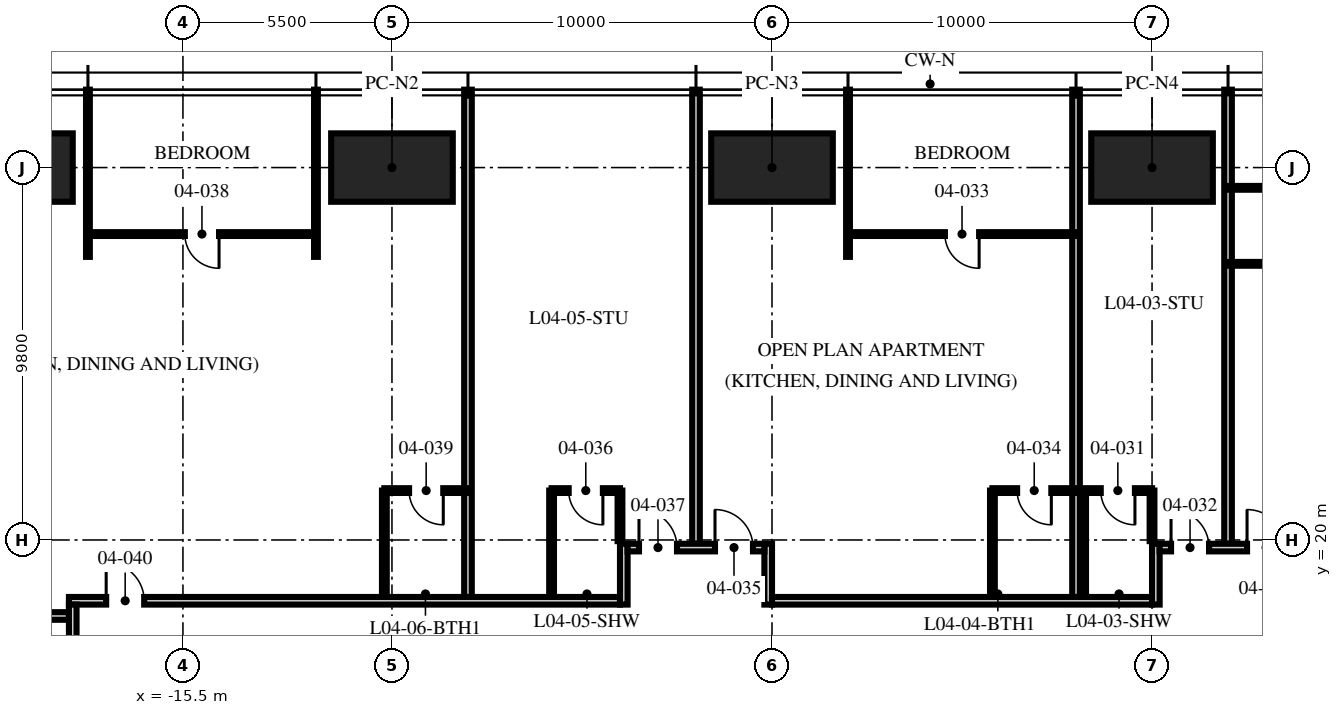
"""IFC4 building model, lengths in metres.
Left out: names, types, materials, properties, quantities, classifications, styles, units other than length and angle.
Written with IfcOpenShell. Run it as: python <this file> out.ifc"""

import sys

from ifc_helpers import new_model, si_unit, direction, frame, frame_2d, origin, origin_2d, place, context, subcontext, project, spatial, rectangle, hollow_rectangle, extrude, element, fill, save


model = new_model("IFC4")
c1 = context("Model", 3, precision=1e-05, world=origin(), true_north=direction((0.0, 1.0)))
c2 = subcontext(c1, "Body", "Model", "MODEL_VIEW")
j1 = project(units=[si_unit("LENGTHUNIT", "METRE"), si_unit("PLANEANGLEUNIT", "RADIAN")], contexts=[c1])
p1 = place(None, origin())
s1 = spatial("IfcSite", under=j1, at=p1, CompositionType="ELEMENT")
p2 = place(p1, origin())
s2 = spatial("IfcBuilding", under=s1, at=p2, CompositionType="ELEMENT")
p3 = place(p2, frame((0.0, 0.0, 21.0)))
s3 = spatial("IfcBuildingStorey", under=s2, at=p3, CompositionType="ELEMENT", Elevation=21.0)
for number, where, z_axis, x_axis in (
    (1, (-20.0, 29.8, 0.0), (0.0, 0.0, 1.0), (1.0, 0.0, 0.0)),
    (2, (-10.0, 29.8, 0.0), (0.0, 0.0, 1.0), (1.0, 0.0, 0.0)),
    (3, (0.0, 29.8, 0.0), (0.0, 0.0, 1.0), (1.0, 0.0, 0.0)),
    (4, (10.0, 29.8, 0.0), (0.0, 0.0, 1.0), (1.0, 0.0, 0.0)),
):
    element("IfcColumn", number, at=place(p3, frame(where, z_axis=z_axis, x_axis=x_axis)), inside=s3, PredefinedType="COLUMN", context=c2, shape_type="SweptSolid", body=[
        extrude(hollow_rectangle(XDim=3.2, YDim=1.8, WallThickness=0.2, at=origin_2d()), origin(), (0.0, 0.0, 1.0), 3.75),
    ])
p4 = place(p3, frame((12.0, 19.9, 0.0), z_axis=(0.0, 0.0, 1.0), x_axis=(0.0, 1.0, 0.0)))
e5 = element("IfcWall", 5, at=p4, inside=s3, PredefinedType="PARTITIONING", context=c2, shape_type="SweptSolid", body=[
    extrude(rectangle(XDim=11.95, YDim=0.2, at=frame_2d((5.975, 0.0))), origin(), (0.0, 0.0, 1.0), 2.71),
])
p5 = place(p3, frame((8.0, 18.5, 0.0), z_axis=(0.0, 0.0, 1.0), x_axis=(0.0, 1.0, 0.0)))
e6 = element("IfcWall", 6, at=p5, inside=s3, PredefinedType="PARTITIONING", context=c2, shape_type="SweptSolid", body=[
    extrude(rectangle(XDim=13.35, YDim=0.2, at=frame_2d((6.675, 0.0))), origin(), (0.0, 0.0, 1.0), 2.71),
])
p6 = place(p3, frame((2.0, 27.45, 0.0), z_axis=(0.0, 0.0, 1.0), x_axis=(0.0, 1.0, 0.0)))
e7 = element("IfcWall", 7, at=p6, inside=s3, PredefinedType="PARTITIONING", context=c2, shape_type="SweptSolid", body=[
    extrude(rectangle(XDim=4.4, YDim=0.1, at=frame_2d((2.2, 0.0))), origin(), (0.0, 0.0, 1.0), 2.71),
])
p7 = place(p3, frame((-2.0, 19.9, 0.0), z_axis=(0.0, 0.0, 1.0), x_axis=(0.0, 1.0, 0.0)))
e8 = element("IfcWall", 8, at=p7, inside=s3, PredefinedType="PARTITIONING", context=c2, shape_type="SweptSolid", body=[
    extrude(rectangle(XDim=11.95, YDim=0.2, at=frame_2d((5.975, 0.0))), origin(), (0.0, 0.0, 1.0), 2.71),
])
p8 = place(p3, frame((-8.0, 18.5, 0.0), z_axis=(0.0, 0.0, 1.0), x_axis=(0.0, 1.0, 0.0)))
e9 = element("IfcWall", 9, at=p8, inside=s3, PredefinedType="PARTITIONING", context=c2, shape_type="SweptSolid", body=[
    extrude(rectangle(XDim=13.35, YDim=0.2, at=frame_2d((6.675, 0.0))), origin(), (0.0, 0.0, 1.0), 2.71),
])
for number, where, z_axis, x_axis in (
    (10, (-12.0, 27.45, 0.0), (0.0, 0.0, 1.0), (0.0, 1.0, 0.0)),
    (11, (-18.0, 27.45, 0.0), (0.0, 0.0, 1.0), (0.0, 1.0, 0.0)),
):
    element("IfcWall", number, at=place(p3, frame(where, z_axis=z_axis, x_axis=x_axis)), inside=s3, PredefinedType="PARTITIONING", context=c2, shape_type="SweptSolid", body=[
        extrude(rectangle(XDim=4.4, YDim=0.1, at=frame_2d((2.2, 0.0))), origin(), (0.0, 0.0, 1.0), 2.71),
    ])
p9 = place(p3, frame((-18.5, 18.0, 0.0), z_axis=(0.0, 0.0, 1.0), x_axis=(-1.0, 0.0, 0.0)))
e12 = element("IfcWall", 12, at=p9, inside=s3, PredefinedType="PARTITIONING", context=c2, shape_type="SweptSolid", body=[
    extrude(rectangle(XDim=13.35, YDim=0.2, at=frame_2d((6.675, 0.0))), origin(), (0.0, 0.0, 1.0), 2.3),
])
p10 = place(p3, frame((18.0, 29.267, 0.0), z_axis=(0.0, 0.0, 1.0), x_axis=(-1.0, 0.0, 0.0)))
e13 = element("IfcWall", 13, at=p10, inside=s3, PredefinedType="PARTITIONING", context=c2, shape_type="SweptSolid", body=[
    extrude(rectangle(XDim=6.0, YDim=0.1, at=frame_2d((3.0, 0.0))), origin(), (0.0, 0.0, 1.0), 2.61),
])
p11 = place(p10, frame((0.15, 0.0, 0.0)))
e14 = element("IfcOpeningElement", 14, at=p11, cuts=e13, PredefinedType="OPENING", context=c2, shape_type="SweptSolid", body=[
    extrude(rectangle(XDim=0.9, YDim=2.1, at=frame_2d((0.45, 1.05))), frame((0.0, 0.06, 0.0), z_axis=(0.0, -1.0, 0.0), x_axis=(1.0, 0.0, 0.0)), (0.0, 0.0, 1.0), 0.12),
])
p12 = place(p10, frame((3.15, 0.0, 0.0)))
e15 = element("IfcOpeningElement", 15, at=p12, cuts=e13, PredefinedType="OPENING", context=c2, shape_type="SweptSolid", body=[
    extrude(rectangle(XDim=0.9, YDim=2.1, at=frame_2d((0.45, 1.05))), frame((0.0, 0.06, 0.0), z_axis=(0.0, -1.0, 0.0), x_axis=(1.0, 0.0, 0.0)), (0.0, 0.0, 1.0), 0.12),
])
p13 = place(p3, frame((16.8, 27.267, 0.0), z_axis=(0.0, 0.0, 1.0), x_axis=(-1.0, 0.0, 0.0)))
e16 = element("IfcWall", 16, at=p13, inside=s3, PredefinedType="PARTITIONING", context=c2, shape_type="SweptSolid", body=[
    extrude(rectangle(XDim=4.8, YDim=0.1, at=frame_2d((2.4, 0.0))), origin(), (0.0, 0.0, 1.0), 2.61),
])
p14 = place(p3, frame((10.0, 21.3, 0.0), z_axis=(0.0, 0.0, 1.0), x_axis=(-1.0, 0.0, 0.0)))
e17 = element("IfcWall", 17, at=p14, inside=s3, PredefinedType="PARTITIONING", context=c2, shape_type="SweptSolid", body=[
    extrude(rectangle(XDim=1.8, YDim=0.125, at=frame_2d((0.9, 0.0))), origin(), (0.0, 0.0, 1.0), 2.492),
])
p15 = place(p14, frame((0.45, 0.0, 0.0)))
e18 = element("IfcOpeningElement", 18, at=p15, cuts=e17, PredefinedType="OPENING", context=c2, shape_type="SweptSolid", body=[
    extrude(rectangle(XDim=0.9, YDim=2.1, at=frame_2d((0.45, 1.05))), frame((0.0, 0.073, 0.0), z_axis=(0.0, -1.0, 0.0), x_axis=(1.0, 0.0, 0.0)), (0.0, 0.0, 1.0), 0.145),
])
p16 = place(p3, frame((10.0, 19.97, 0.0), z_axis=(0.0, 0.0, 1.0), x_axis=(0.0, 1.0, 0.0)))
e19 = element("IfcWall", 19, at=p16, inside=s3, PredefinedType="PARTITIONING", context=c2, shape_type="SweptSolid", body=[
    extrude(rectangle(XDim=1.33, YDim=0.125, at=frame_2d((0.665, 0.0))), origin(), (0.0, 0.0, 1.0), 2.492),
])
p17 = place(p3, frame((8.2, 18.5, 0.0), z_axis=(0.0, 0.0, 1.0), x_axis=(0.0, 1.0, 0.0)))
e20 = element("IfcWall", 20, at=p17, inside=s3, PredefinedType="PARTITIONING", context=c2, shape_type="SweptSolid", body=[
    extrude(rectangle(XDim=2.8, YDim=0.125, at=frame_2d((1.4, 0.0))), origin(), (0.0, 0.0, 1.0), 3.5),
])
p18 = place(p3, frame((8.0, 28.05, 0.0), z_axis=(0.0, 0.0, 1.0), x_axis=(-1.0, 0.0, 0.0)))
e21 = element("IfcWall", 21, at=p18, inside=s3, PredefinedType="PARTITIONING", context=c2, shape_type="SweptSolid", body=[
    extrude(rectangle(XDim=6.0, YDim=0.1, at=frame_2d((3.0, 0.0))), origin(), (0.0, 0.0, 1.0), 2.61),
])
p19 = place(p18, frame((2.55, 0.0, 0.0)))
e22 = element("IfcOpeningElement", 22, at=p19, cuts=e21, PredefinedType="OPENING", context=c2, shape_type="SweptSolid", body=[
    extrude(rectangle(XDim=0.9, YDim=2.1, at=frame_2d((0.45, 1.05))), frame((0.0, 0.06, 0.0), z_axis=(0.0, -1.0, 0.0), x_axis=(1.0, 0.0, 0.0)), (0.0, 0.0, 1.0), 0.12),
])
p20 = place(p3, frame((8.0, 21.3, 0.0), z_axis=(0.0, 0.0, 1.0), x_axis=(-1.0, 0.0, 0.0)))
e23 = element("IfcWall", 23, at=p20, inside=s3, PredefinedType="PARTITIONING", context=c2, shape_type="SweptSolid", body=[
    extrude(rectangle(XDim=2.2, YDim=0.125, at=frame_2d((1.1, 0.0))), origin(), (0.0, 0.0, 1.0), 3.5),
])
p21 = place(p20, frame((0.65, 0.0, 0.0)))
e24 = element("IfcOpeningElement", 24, at=p21, cuts=e23, PredefinedType="OPENING", context=c2, shape_type="SweptSolid", body=[
    extrude(rectangle(XDim=0.9, YDim=2.1, at=frame_2d((0.45, 1.05))), frame((0.0, 0.073, 0.0), z_axis=(0.0, -1.0, 0.0), x_axis=(1.0, 0.0, 0.0)), (0.0, 0.0, 1.0), 0.145),
])
p22 = place(p3, frame((5.8, 18.5, 0.0), z_axis=(0.0, 0.0, 1.0), x_axis=(0.0, 1.0, 0.0)))
e25 = element("IfcWall", 25, at=p22, inside=s3, PredefinedType="PARTITIONING", context=c2, shape_type="SweptSolid", body=[
    extrude(rectangle(XDim=2.8, YDim=0.125, at=frame_2d((1.4, 0.0))), origin(), (0.0, 0.0, 1.0), 3.5),
])
p23 = place(p3, frame((-4.0, 21.3, 0.0), z_axis=(0.0, 0.0, 1.0), x_axis=(-1.0, 0.0, 0.0)))
e26 = element("IfcWall", 26, at=p23, inside=s3, PredefinedType="PARTITIONING", context=c2, shape_type="SweptSolid", body=[
    extrude(rectangle(XDim=1.8, YDim=0.125, at=frame_2d((0.9, 0.0))), origin(), (0.0, 0.0, 1.0), 2.61),
])
p24 = place(p23, frame((0.45, 0.0, 0.0)))
e27 = element("IfcOpeningElement", 27, at=p24, cuts=e26, PredefinedType="OPENING", context=c2, shape_type="SweptSolid", body=[
    extrude(rectangle(XDim=0.9, YDim=2.1, at=frame_2d((0.45, 1.05))), frame((0.0, 0.073, 0.0), z_axis=(0.0, -1.0, 0.0), x_axis=(1.0, 0.0, 0.0)), (0.0, 0.0, 1.0), 0.145),
])
p25 = place(p3, frame((-4.0, 19.97, 0.0), z_axis=(0.0, 0.0, 1.0), x_axis=(0.0, 1.0, 0.0)))
e28 = element("IfcWall", 28, at=p25, inside=s3, PredefinedType="PARTITIONING", context=c2, shape_type="SweptSolid", body=[
    extrude(rectangle(XDim=1.33, YDim=0.125, at=frame_2d((0.665, 0.0))), origin(), (0.0, 0.0, 1.0), 3.5),
])
p26 = place(p3, frame((-5.8, 18.5, 0.0), z_axis=(0.0, 0.0, 1.0), x_axis=(0.0, 1.0, 0.0)))
e29 = element("IfcWall", 29, at=p26, inside=s3, PredefinedType="PARTITIONING", context=c2, shape_type="SweptSolid", body=[
    extrude(rectangle(XDim=2.8, YDim=0.125, at=frame_2d((1.4, 0.0))), origin(), (0.0, 0.0, 1.0), 3.5),
])
p27 = place(p3, frame((-12.0, 28.05, 0.0), z_axis=(0.0, 0.0, 1.0), x_axis=(-1.0, 0.0, 0.0)))
e30 = element("IfcWall", 30, at=p27, inside=s3, PredefinedType="PARTITIONING", context=c2, shape_type="SweptSolid", body=[
    extrude(rectangle(XDim=6.0, YDim=0.1, at=frame_2d((3.0, 0.0))), origin(), (0.0, 0.0, 1.0), 2.61),
])
p28 = place(p27, frame((2.55, 0.0, 0.0)))
e31 = element("IfcOpeningElement", 31, at=p28, cuts=e30, PredefinedType="OPENING", context=c2, shape_type="SweptSolid", body=[
    extrude(rectangle(XDim=0.9, YDim=2.1, at=frame_2d((0.45, 1.05))), frame((0.0, 0.06, 0.0), z_axis=(0.0, -1.0, 0.0), x_axis=(1.0, 0.0, 0.0)), (0.0, 0.0, 1.0), 0.12),
])
p29 = place(p3, frame((-8.0, 21.3, 0.0), z_axis=(0.0, 0.0, 1.0), x_axis=(-1.0, 0.0, 0.0)))
e32 = element("IfcWall", 32, at=p29, inside=s3, PredefinedType="PARTITIONING", context=c2, shape_type="SweptSolid", body=[
    extrude(rectangle(XDim=2.2, YDim=0.125, at=frame_2d((1.1, 0.0))), origin(), (0.0, 0.0, 1.0), 2.492),
])
p30 = place(p29, frame((0.65, 0.0, 0.0)))
e33 = element("IfcOpeningElement", 33, at=p30, cuts=e32, PredefinedType="OPENING", context=c2, shape_type="SweptSolid", body=[
    extrude(rectangle(XDim=0.9, YDim=2.1, at=frame_2d((0.45, 1.05))), frame((0.0, 0.073, 0.0), z_axis=(0.0, -1.0, 0.0), x_axis=(1.0, 0.0, 0.0)), (0.0, 0.0, 1.0), 0.145),
])
p31 = place(p3, frame((-10.2, 18.5, 0.0), z_axis=(0.0, 0.0, 1.0), x_axis=(0.0, 1.0, 0.0)))
e34 = element("IfcWall", 34, at=p31, inside=s3, PredefinedType="PARTITIONING", context=c2, shape_type="SweptSolid", body=[
    extrude(rectangle(XDim=2.8, YDim=0.125, at=frame_2d((1.4, 0.0))), origin(), (0.0, 0.0, 1.0), 2.492),
])
p32 = place(p3, frame((-18.5, 18.4, 0.0), z_axis=(0.0, 0.0, 1.0), x_axis=(1.0, 0.0, 0.0)))
e35 = element("IfcWall", 35, at=p32, inside=s3, PredefinedType="PARTITIONING", context=c2, shape_type="SweptSolid", body=[
    extrude(rectangle(XDim=14.5, YDim=0.2, at=frame_2d((7.25, 0.0))), origin(), (0.0, 0.0, 1.0), 2.3),
])
p33 = place(p32, frame((0.98, 0.0, 0.0)))
e36 = element("IfcOpeningElement", 36, at=p33, cuts=e35, PredefinedType="OPENING", context=c2, shape_type="SweptSolid", body=[
    extrude(rectangle(XDim=1.0, YDim=2.2, at=frame_2d((0.5, 1.1))), frame((0.0, 0.11, 0.0), z_axis=(0.0, -1.0, 0.0), x_axis=(1.0, 0.0, 0.0)), (0.0, 0.0, 1.0), 0.22),
])
p34 = place(p3, frame((-3.9, 18.3, 0.0), z_axis=(0.0, 0.0, 1.0), x_axis=(0.0, 1.0, 0.0)))
e37 = element("IfcWall", 37, at=p34, inside=s3, PredefinedType="PARTITIONING", context=c2, shape_type="SweptSolid", body=[
    extrude(rectangle(XDim=1.6, YDim=0.2, at=frame_2d((0.8, 0.0))), origin(), (0.0, 0.0, 1.0), 3.5),
])
p35 = place(p3, frame((-0.1, 18.3, 0.0), z_axis=(0.0, 0.0, 1.0), x_axis=(0.0, 1.0, 0.0)))
e38 = element("IfcWall", 38, at=p35, inside=s3, PredefinedType="PARTITIONING", context=c2, shape_type="SweptSolid", body=[
    extrude(rectangle(XDim=1.6, YDim=0.2, at=frame_2d((0.8, 0.0))), origin(), (0.0, 0.0, 1.0), 2.492),
])
p36 = place(p3, frame((-3.8, 19.8, 0.0), z_axis=(0.0, 0.0, 1.0), x_axis=(1.0, 0.0, 0.0)))
e39 = element("IfcWall", 39, at=p36, inside=s3, PredefinedType="PARTITIONING", context=c2, shape_type="SweptSolid", body=[
    extrude(rectangle(XDim=3.6, YDim=0.2, at=frame_2d((1.8, 0.0))), origin(), (0.0, 0.0, 1.0), 3.5),
])
p37 = place(p36, frame((2.3, 0.0, 0.0)))
e40 = element("IfcOpeningElement", 40, at=p37, cuts=e39, PredefinedType="OPENING", context=c2, shape_type="SweptSolid", body=[
    extrude(rectangle(XDim=1.0, YDim=2.2, at=frame_2d((0.5, 1.1))), frame((0.0, 0.11, 0.0), z_axis=(0.0, -1.0, 0.0), x_axis=(1.0, 0.0, 0.0)), (0.0, 0.0, 1.0), 0.22),
])
p38 = place(p36, frame((0.3, 0.0, 0.0)))
e41 = element("IfcOpeningElement", 41, at=p38, cuts=e39, PredefinedType="OPENING", context=c2, shape_type="SweptSolid", body=[
    extrude(rectangle(XDim=1.0, YDim=2.2, at=frame_2d((0.5, 1.1))), frame((0.0, 0.11, 0.0), z_axis=(0.0, -1.0, 0.0), x_axis=(1.0, 0.0, 0.0)), (0.0, 0.0, 1.0), 0.22),
])
p39 = place(p3, frame((0.0, 18.4, 0.0), z_axis=(0.0, 0.0, 1.0), x_axis=(1.0, 0.0, 0.0)))
e42 = element("IfcWall", 42, at=p39, inside=s3, PredefinedType="PARTITIONING", context=c2, shape_type="SweptSolid", body=[
    extrude(rectangle(XDim=10.0, YDim=0.2, at=frame_2d((5.0, 0.0))), origin(), (0.0, 0.0, 1.0), 2.492),
])
p40 = place(p3, frame((10.1, 18.3, 0.0), z_axis=(0.0, 0.0, 1.0), x_axis=(0.0, 1.0, 0.0)))
e43 = element("IfcWall", 43, at=p40, inside=s3, PredefinedType="PARTITIONING", context=c2, shape_type="SweptSolid", body=[
    extrude(rectangle(XDim=1.6, YDim=0.2, at=frame_2d((0.8, 0.0))), origin(), (0.0, 0.0, 1.0), 2.492),
])
p41 = place(p3, frame((10.2, 19.8, 0.0), z_axis=(0.0, 0.0, 1.0), x_axis=(1.0, 0.0, 0.0)))
e44 = element("IfcWall", 44, at=p41, inside=s3, PredefinedType="PARTITIONING", context=c2, shape_type="SweptSolid", body=[
    extrude(rectangle(XDim=3.6, YDim=0.2, at=frame_2d((1.8, 0.0))), origin(), (0.0, 0.0, 1.0), 3.5),
])
p42 = place(p41, frame((2.3, 0.0, 0.0)))
e45 = element("IfcOpeningElement", 45, at=p42, cuts=e44, PredefinedType="OPENING", context=c2, shape_type="SweptSolid", body=[
    extrude(rectangle(XDim=1.0, YDim=2.2, at=frame_2d((0.5, 1.1))), frame((0.0, 0.11, 0.0), z_axis=(0.0, -1.0, 0.0), x_axis=(1.0, 0.0, 0.0)), (0.0, 0.0, 1.0), 0.22),
])
p43 = place(p41, frame((0.3, 0.0, 0.0)))
e46 = element("IfcOpeningElement", 46, at=p43, cuts=e44, PredefinedType="OPENING", context=c2, shape_type="SweptSolid", body=[
    extrude(rectangle(XDim=1.0, YDim=2.2, at=frame_2d((0.5, 1.1))), frame((0.0, 0.11, 0.0), z_axis=(0.0, -1.0, 0.0), x_axis=(1.0, 0.0, 0.0)), (0.0, 0.0, 1.0), 0.22),
])
p44 = place(p3, frame((-18.4, 18.3, 0.0), z_axis=(0.0, 0.0, 1.0), x_axis=(0.0, -1.0, 0.0)))
e47 = element("IfcWall", 47, at=p44, inside=s3, PredefinedType="PARTITIONING", context=c2, shape_type="SweptSolid", body=[
    extrude(rectangle(XDim=36.6, YDim=0.2, at=frame_2d((18.3, 0.0))), origin(), (0.0, 0.0, 1.0), 2.3),
])
p45 = place(p44, frame((8.57, 0.0, 0.0)))
e48 = element("IfcOpeningElement", 48, at=p45, cuts=e47, PredefinedType="OPENING", context=c2, shape_type="SweptSolid", body=[
    extrude(rectangle(XDim=1.0, YDim=2.2, at=frame_2d((0.5, 1.1))), frame((0.0, 0.11, 0.0), z_axis=(0.0, -1.0, 0.0), x_axis=(1.0, 0.0, 0.0)), (0.0, 0.0, 1.0), 0.22),
])
p46 = place(p44, frame((24.57, 0.0, 0.0)))
e49 = element("IfcOpeningElement", 49, at=p46, cuts=e47, PredefinedType="OPENING", context=c2, shape_type="SweptSolid", body=[
    extrude(rectangle(XDim=1.0, YDim=2.2, at=frame_2d((0.5, 1.1))), frame((0.0, 0.11, 0.0), z_axis=(0.0, -1.0, 0.0), x_axis=(1.0, 0.0, 0.0)), (0.0, 0.0, 1.0), 0.22),
])
p47 = place(p44, frame((28.87, 0.0, 0.0)))
e50 = element("IfcOpeningElement", 50, at=p47, cuts=e47, PredefinedType="OPENING", context=c2, shape_type="SweptSolid", body=[
    extrude(rectangle(XDim=1.0, YDim=2.2, at=frame_2d((0.5, 1.1))), frame((0.0, 0.11, 0.0), z_axis=(0.0, -1.0, 0.0), x_axis=(1.0, 0.0, 0.0)), (0.0, 0.0, 1.0), 0.22),
])
p48 = place(p44, frame((34.82, 0.0, 0.0)))
e51 = element("IfcOpeningElement", 51, at=p48, cuts=e47, PredefinedType="OPENING", context=c2, shape_type="SweptSolid", body=[
    extrude(rectangle(XDim=1.0, YDim=2.2, at=frame_2d((0.5, 1.1))), frame((0.0, 0.11, 0.0), z_axis=(0.0, -1.0, 0.0), x_axis=(1.0, 0.0, 0.0)), (0.0, 0.0, 1.0), 0.22),
])
p49 = place(p42, origin())
e52 = element("IfcDoor", 52, at=p49, inside=s3, OperationType="SINGLE_SWING_LEFT", PredefinedType="DOOR", context=c2, shape_type="SweptSolid", body=[
    extrude(rectangle(XDim=1.0, YDim=2.2, at=frame_2d((0.5, 1.1))), frame((0.0, 0.025, 0.0), z_axis=(0.0, -1.0, 0.0), x_axis=(1.0, 0.0, 0.0)), (0.0, 0.0, 1.0), 0.05),
])
fill(e45, e52)
p50 = place(p15, origin())
e53 = element("IfcDoor", 53, at=p50, inside=s3, OperationType="SINGLE_SWING_LEFT", PredefinedType="DOOR", context=c2, shape_type="SweptSolid", body=[
    extrude(rectangle(XDim=0.9, YDim=2.1, at=frame_2d((0.45, 1.05))), frame((0.0, 0.025, 0.0), z_axis=(0.0, -1.0, 0.0), x_axis=(1.0, 0.0, 0.0)), (0.0, 0.0, 1.0), 0.05),
])
fill(e18, e53)
p51 = place(p43, origin())
e54 = element("IfcDoor", 54, at=p51, inside=s3, OperationType="SINGLE_SWING_LEFT", PredefinedType="DOOR", context=c2, shape_type="SweptSolid", body=[
    extrude(rectangle(XDim=1.0, YDim=2.2, at=frame_2d((0.5, 1.1))), frame((0.0, 0.025, 0.0), z_axis=(0.0, -1.0, 0.0), x_axis=(1.0, 0.0, 0.0)), (0.0, 0.0, 1.0), 0.05),
])
fill(e46, e54)
p52 = place(p19, origin())
e55 = element("IfcDoor", 55, at=p52, inside=s3, OperationType="SINGLE_SWING_LEFT", PredefinedType="DOOR", context=c2, shape_type="SweptSolid", body=[
    extrude(rectangle(XDim=0.9, YDim=2.1, at=frame_2d((0.45, 1.05))), frame((0.0, 0.025, 0.0), z_axis=(0.0, -1.0, 0.0), x_axis=(1.0, 0.0, 0.0)), (0.0, 0.0, 1.0), 0.05),
])
fill(e22, e55)
p53 = place(p21, origin())
e56 = element("IfcDoor", 56, at=p53, inside=s3, OperationType="SINGLE_SWING_LEFT", PredefinedType="DOOR", context=c2, shape_type="SweptSolid", body=[
    extrude(rectangle(XDim=0.9, YDim=2.1, at=frame_2d((0.45, 1.05))), frame((0.0, 0.025, 0.0), z_axis=(0.0, -1.0, 0.0), x_axis=(1.0, 0.0, 0.0)), (0.0, 0.0, 1.0), 0.05),
])
fill(e24, e56)
p54 = place(p37, origin())
e57 = element("IfcDoor", 57, at=p54, inside=s3, OperationType="SINGLE_SWING_LEFT", PredefinedType="DOOR", context=c2, shape_type="SweptSolid", body=[
    extrude(rectangle(XDim=1.0, YDim=2.2, at=frame_2d((0.5, 1.1))), frame((0.0, 0.025, 0.0), z_axis=(0.0, -1.0, 0.0), x_axis=(1.0, 0.0, 0.0)), (0.0, 0.0, 1.0), 0.05),
])
fill(e40, e57)
p55 = place(p24, origin())
e58 = element("IfcDoor", 58, at=p55, inside=s3, OperationType="SINGLE_SWING_LEFT", PredefinedType="DOOR", context=c2, shape_type="SweptSolid", body=[
    extrude(rectangle(XDim=0.9, YDim=2.1, at=frame_2d((0.45, 1.05))), frame((0.0, 0.025, 0.0), z_axis=(0.0, -1.0, 0.0), x_axis=(1.0, 0.0, 0.0)), (0.0, 0.0, 1.0), 0.05),
])
fill(e27, e58)
p56 = place(p38, origin())
e59 = element("IfcDoor", 59, at=p56, inside=s3, OperationType="SINGLE_SWING_LEFT", PredefinedType="DOOR", context=c2, shape_type="SweptSolid", body=[
    extrude(rectangle(XDim=1.0, YDim=2.2, at=frame_2d((0.5, 1.1))), frame((0.0, 0.025, 0.0), z_axis=(0.0, -1.0, 0.0), x_axis=(1.0, 0.0, 0.0)), (0.0, 0.0, 1.0), 0.05),
])
fill(e41, e59)
p57 = place(p28, origin())
e60 = element("IfcDoor", 60, at=p57, inside=s3, OperationType="SINGLE_SWING_LEFT", PredefinedType="DOOR", context=c2, shape_type="SweptSolid", body=[
    extrude(rectangle(XDim=0.9, YDim=2.1, at=frame_2d((0.45, 1.05))), frame((0.0, 0.025, 0.0), z_axis=(0.0, -1.0, 0.0), x_axis=(1.0, 0.0, 0.0)), (0.0, 0.0, 1.0), 0.05),
])
fill(e31, e60)
p58 = place(p30, origin())
e61 = element("IfcDoor", 61, at=p58, inside=s3, OperationType="SINGLE_SWING_LEFT", PredefinedType="DOOR", context=c2, shape_type="SweptSolid", body=[
    extrude(rectangle(XDim=0.9, YDim=2.1, at=frame_2d((0.45, 1.05))), frame((0.0, 0.025, 0.0), z_axis=(0.0, -1.0, 0.0), x_axis=(1.0, 0.0, 0.0)), (0.0, 0.0, 1.0), 0.05),
])
fill(e33, e61)
p59 = place(p33, origin())
e62 = element("IfcDoor", 62, at=p59, inside=s3, OperationType="SINGLE_SWING_LEFT", PredefinedType="DOOR", context=c2, shape_type="SweptSolid", body=[
    extrude(rectangle(XDim=1.0, YDim=2.2, at=frame_2d((0.5, 1.1))), frame((0.0, 0.025, 0.0), z_axis=(0.0, -1.0, 0.0), x_axis=(1.0, 0.0, 0.0)), (0.0, 0.0, 1.0), 0.05),
])
fill(e36, e62)
save(model, sys.argv[1])
